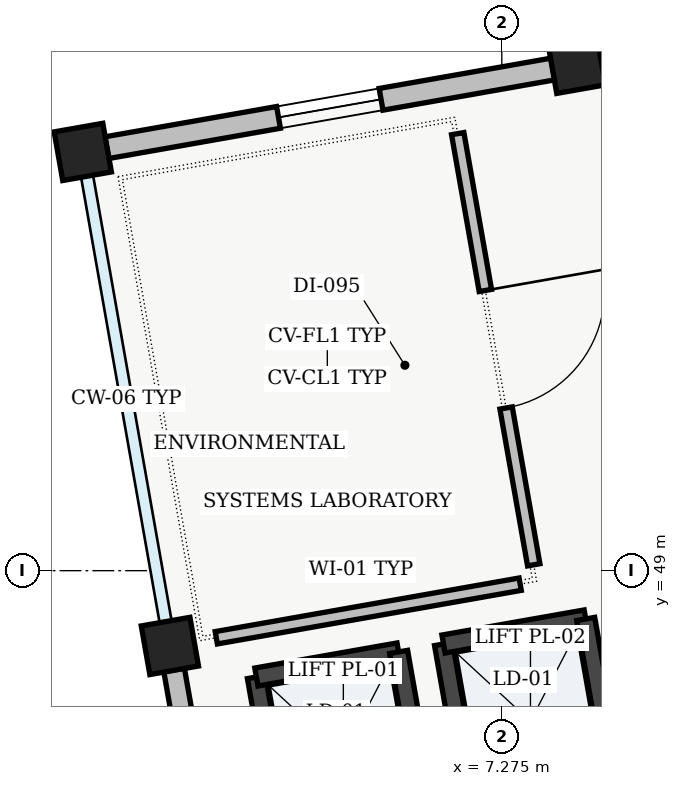
"""IFC4 building model, lengths in metres.
Left out: names, types, materials, properties, quantities, classifications, styles, units other than length and angle.
Written with IfcOpenShell. Run it as: python <this file> out.ifc"""

import sys

from ifc_helpers import new_model, si_unit, direction, frame, frame_2d, origin, origin_2d, place, context, subcontext, project, spatial, rectangle, extrude, element, fill, save


model = new_model("IFC4")
c1 = context("Model", 3, precision=1e-05, world=origin(), true_north=direction((0.0, 1.0)))
c2 = subcontext(c1, "Body", "Model", "MODEL_VIEW")
j1 = project(units=[si_unit("LENGTHUNIT", "METRE"), si_unit("PLANEANGLEUNIT", "RADIAN")], contexts=[c1])
p1 = place(None, origin())
s1 = spatial("IfcSite", under=j1, at=p1, CompositionType="ELEMENT")
p2 = place(p1, origin())
s2 = spatial("IfcBuilding", under=s1, at=p2, CompositionType="ELEMENT")
p3 = place(p2, frame((0.0, 0.0, 14.1)))
s3 = spatial("IfcBuildingStorey", under=s2, at=p3, CompositionType="ELEMENT", Elevation=14.1)
for number, where, z_axis, x_axis in (
    (1, (2.908, 48.01, 0.0), (0.0, 0.0, 1.0), (0.985, 0.174, 0.0)),
    (2, (1.762, 54.509, 0.0), (0.0, 0.0, 1.0), (0.985, 0.174, 0.0)),
    (3, (8.261, 55.655, 0.0), (0.0, 0.0, 1.0), (0.985, 0.174, 0.0)),
):
    element("IfcColumn", number, at=place(p3, frame(where, z_axis=z_axis, x_axis=x_axis)), inside=s3, PredefinedType="COLUMN", context=c2, shape_type="SweptSolid", body=[
        extrude(rectangle(XDim=0.65, YDim=0.65, at=origin_2d()), origin(), (0.0, 0.0, 1.0), 4.31),
    ])
p4 = place(p3, frame((3.998, 41.825, 0.0), z_axis=(0.0, 0.0, 1.0), x_axis=(-0.173645120828, 0.98480829201, 0.0)))
e4 = element("IfcWall", 4, at=p4, inside=s3, PredefinedType="STANDARD", context=c2, shape_type="SweptSolid", body=[
    extrude(rectangle(XDim=5.96, YDim=0.275, at=frame_2d((2.98, 0.0))), origin(), (0.0, 0.0, 1.0), 3.795),
])
p5 = place(p4, frame((2.25, 0.0, 0.95)))
e5 = element("IfcOpeningElement", 5, at=p5, cuts=e4, PredefinedType="OPENING", context=c2, shape_type="SweptSolid", body=[
    extrude(rectangle(XDim=1.46, YDim=1.44, at=frame_2d((0.73, 0.72))), frame((0.0, 0.137, 0.0), z_axis=(0.0, -1.0, 0.0), x_axis=(1.0, 0.0, 0.0)), (0.0, 0.0, 1.0), 0.275),
])
p6 = place(p3, frame((2.077, 54.565, 0.0), z_axis=(0.0, 0.0, 1.0), x_axis=(0.98480829201, 0.173645120828, 0.0)))
e6 = element("IfcWall", 6, at=p6, inside=s3, PredefinedType="STANDARD", context=c2, shape_type="SweptSolid", body=[
    extrude(rectangle(XDim=5.96, YDim=0.29, at=frame_2d((2.98, 0.0))), origin(), (0.0, 0.0, 1.0), 3.795),
])
p7 = place(p6, frame((2.295, 0.0, 0.95)))
e7 = element("IfcOpeningElement", 7, at=p7, cuts=e6, PredefinedType="OPENING", context=c2, shape_type="SweptSolid", body=[
    extrude(rectangle(XDim=1.37, YDim=1.42, at=frame_2d((0.685, 0.71))), frame((0.0, 0.145, 0.0), z_axis=(0.0, -1.0, 0.0), x_axis=(1.0, 0.0, 0.0)), (0.0, 0.0, 1.0), 0.29),
])
p8 = place(p3, frame((4.463, 45.237, 0.0), z_axis=(0.0, 0.0, 1.0), x_axis=(-0.173646056486, 0.984808127031, 0.0)))
e8 = element("IfcWall", 8, at=p8, inside=s3, PredefinedType="SHEAR", context=c2, shape_type="SweptSolid", body=[
    extrude(rectangle(XDim=2.4, YDim=0.24, at=frame_2d((1.2, 0.0))), origin(), (0.0, 0.0, 1.0), 4.28),
])
p9 = place(p3, frame((4.046, 47.601, 0.0), z_axis=(0.0, 0.0, 1.0), x_axis=(0.984793905749, 0.173726691098, 0.0)))
e9 = element("IfcWall", 9, at=p9, inside=s3, PredefinedType="SHEAR", context=c2, shape_type="SweptSolid", body=[
    extrude(rectangle(XDim=1.9, YDim=0.24, at=frame_2d((0.95, 0.0))), origin(), (0.0, 0.0, 1.0), 4.28),
])
for number, where, z_axis, x_axis in (
    (10, (5.917, 47.931, 0.0), (0.0, 0.0, 1.0), (0.174, -0.985, 0.0)),
    (11, (6.925, 45.671, 0.0), (0.0, 0.0, 1.0), (-0.174, 0.985, 0.0)),
):
    element("IfcWall", number, at=place(p3, frame(where, z_axis=z_axis, x_axis=x_axis)), inside=s3, PredefinedType="SHEAR", context=c2, shape_type="SweptSolid", body=[
        extrude(rectangle(XDim=2.4, YDim=0.24, at=frame_2d((1.2, 0.0))), origin(), (0.0, 0.0, 1.0), 4.28),
    ])
p10 = place(p3, frame((6.508, 48.035, 0.0), z_axis=(0.0, 0.0, 1.0), x_axis=(0.984793905749, 0.173726691098, 0.0)))
e12 = element("IfcWall", 12, at=p10, inside=s3, PredefinedType="SHEAR", context=c2, shape_type="SweptSolid", body=[
    extrude(rectangle(XDim=1.9, YDim=0.24, at=frame_2d((0.95, 0.0))), origin(), (0.0, 0.0, 1.0), 4.28),
])
p11 = place(p3, frame((8.379, 48.365, 0.0), z_axis=(0.0, 0.0, 1.0), x_axis=(0.173646056486, -0.984808127031, 0.0)))
e13 = element("IfcWall", 13, at=p11, inside=s3, PredefinedType="SHEAR", context=c2, shape_type="SweptSolid", body=[
    extrude(rectangle(XDim=2.4, YDim=0.24, at=frame_2d((1.2, 0.0))), origin(), (0.0, 0.0, 1.0), 4.28),
])
p12 = place(p3, frame((3.518, 48.117, 0.0), z_axis=(0.0, 0.0, 1.0), x_axis=(0.984816834462, 0.173596666326, 0.0)))
e14 = element("IfcWall", 14, at=p12, inside=s3, PredefinedType="PARTITIONING", context=c2, shape_type="SweptSolid", body=[
    extrude(rectangle(XDim=4.06, YDim=0.165, at=frame_2d((2.03, 0.0))), origin(), (0.0, 0.0, 1.0), 3.645),
])
p13 = place(p3, frame((7.695, 49.077, 0.0), z_axis=(0.0, 0.0, 1.0), x_axis=(-0.173649928941, 0.984807444214, 0.0)))
e15 = element("IfcWall", 15, at=p13, inside=s3, PredefinedType="PARTITIONING", context=c2, shape_type="SweptSolid", body=[
    extrude(rectangle(XDim=5.76, YDim=0.165, at=frame_2d((2.88, 0.0))), origin(), (0.0, 0.0, 1.0), 3.95),
])
p14 = place(p13, frame((2.095, 0.0, 0.0)))
e16 = element("IfcOpeningElement", 16, at=p14, cuts=e15, PredefinedType="OPENING", context=c2, shape_type="SweptSolid", body=[
    extrude(rectangle(XDim=1.57, YDim=2.16, at=frame_2d((0.785, 1.08))), frame((0.0, 0.083, 0.0), z_axis=(0.0, -1.0, 0.0), x_axis=(1.0, 0.0, 0.0)), (0.0, 0.0, 1.0), 0.165),
])
p15 = place(p7, origin())
e17 = element("IfcWindow", 17, at=p15, inside=s3, PartitioningType="SINGLE_PANEL", PredefinedType="WINDOW", context=c2, shape_type="SweptSolid", body=[
    extrude(rectangle(XDim=1.37, YDim=1.42, at=frame_2d((0.685, 0.71))), frame((0.0, 0.03, 0.0), z_axis=(0.0, -1.0, 0.0), x_axis=(1.0, 0.0, 0.0)), (0.0, 0.0, 1.0), 0.06),
])
fill(e7, e17)
p16 = place(p14, origin())
e18 = element("IfcDoor", 18, at=p16, inside=s3, OperationType="SINGLE_SWING_RIGHT", PredefinedType="DOOR", context=c2, shape_type="SweptSolid", body=[
    extrude(rectangle(XDim=1.57, YDim=2.16, at=frame_2d((0.785, 1.08))), frame((0.0, 0.025, 0.0), z_axis=(0.0, -1.0, 0.0), x_axis=(1.0, 0.0, 0.0)), (0.0, 0.0, 1.0), 0.05),
])
fill(e16, e18)
save(model, sys.argv[1])
